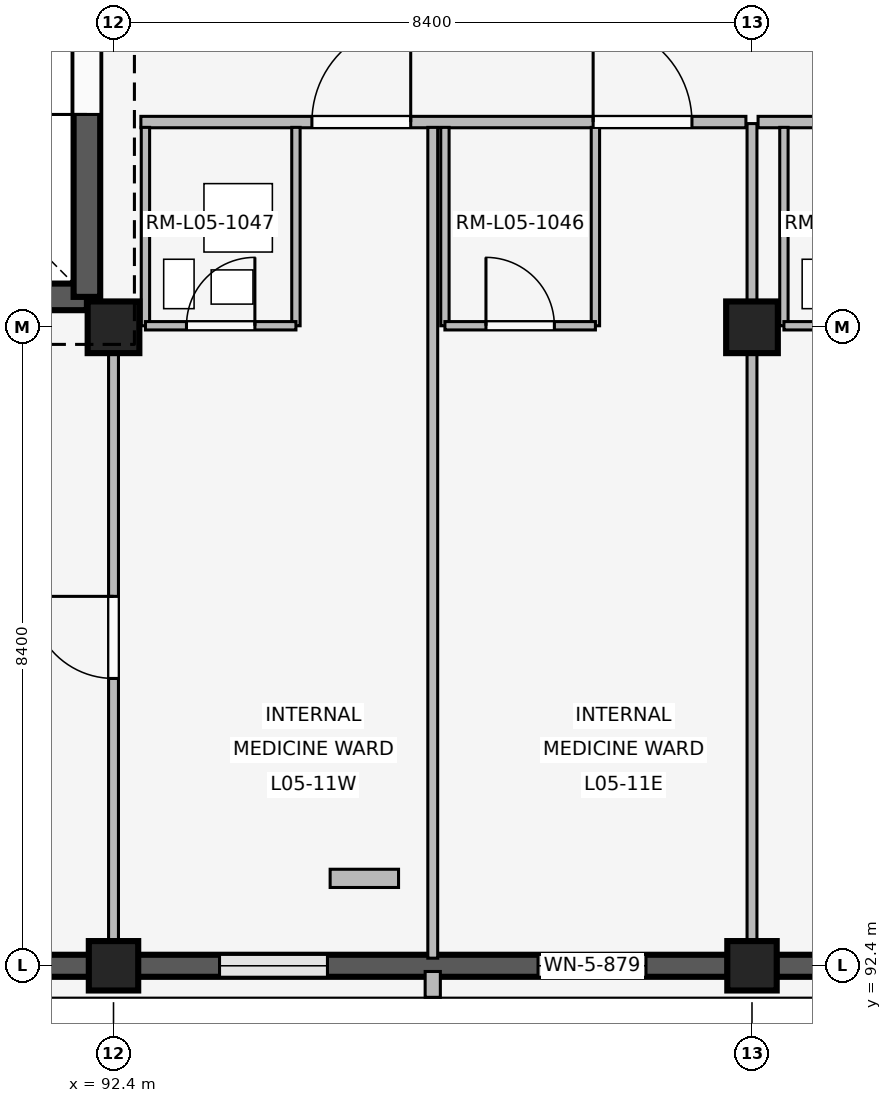
"""IFC4 building model, lengths in metres.
Left out: names, types, materials, properties, quantities, classifications, styles, units other than length and angle.
Written with IfcOpenShell. Run it as: python <this file> out.ifc"""

import sys

from ifc_helpers import new_model, si_unit, direction, frame, frame_2d, origin, origin_2d, place, context, subcontext, project, spatial, rectangle, extrude, element, fill, save


model = new_model("IFC4")
c1 = context("Model", 3, precision=1e-05, world=origin(), true_north=direction((0.0, 1.0)))
c2 = subcontext(c1, "Body", "Model", "MODEL_VIEW")
j1 = project(units=[si_unit("LENGTHUNIT", "METRE"), si_unit("PLANEANGLEUNIT", "RADIAN")], contexts=[c1])
p1 = place(None, origin())
s1 = spatial("IfcSite", under=j1, at=p1, CompositionType="ELEMENT")
p2 = place(p1, origin())
s2 = spatial("IfcBuilding", under=s1, at=p2, CompositionType="ELEMENT")
p3 = place(p2, frame((0.0, 0.0, 20.4)))
s3 = spatial("IfcBuildingStorey", under=s2, at=p3, CompositionType="ELEMENT", Elevation=20.4)
p4 = place(p3, frame((92.4, 92.4, 0.0), z_axis=(0.0, 0.0, 1.0), x_axis=(1.0, 0.0, 0.0)))
e1 = element("IfcColumn", 1, at=p4, inside=s3, PredefinedType="COLUMN", context=c2, shape_type="SweptSolid", body=[
    extrude(rectangle(XDim=0.65, YDim=0.65, at=origin_2d()), origin(), (0.0, 0.0, 1.0), 4.2),
])
p5 = place(p3, frame((92.4, 100.8, 0.0), z_axis=(0.0, 0.0, 1.0), x_axis=(1.0, 0.0, 0.0)))
e2 = element("IfcColumn", 2, at=p5, inside=s3, PredefinedType="COLUMN", context=c2, shape_type="SweptSolid", body=[
    extrude(rectangle(XDim=0.68, YDim=0.68, at=origin_2d()), origin(), (0.0, 0.0, 1.0), 4.2),
])
p6 = place(p3, frame((100.8, 92.4, 0.0), z_axis=(0.0, 0.0, 1.0), x_axis=(1.0, 0.0, 0.0)))
e3 = element("IfcColumn", 3, at=p6, inside=s3, PredefinedType="COLUMN", context=c2, shape_type="SweptSolid", body=[
    extrude(rectangle(XDim=0.65, YDim=0.65, at=origin_2d()), origin(), (0.0, 0.0, 1.0), 4.2),
])
p7 = place(p3, frame((100.8, 100.8, 0.0), z_axis=(0.0, 0.0, 1.0), x_axis=(1.0, 0.0, 0.0)))
e4 = element("IfcColumn", 4, at=p7, inside=s3, PredefinedType="COLUMN", context=c2, shape_type="SweptSolid", body=[
    extrude(rectangle(XDim=0.68, YDim=0.68, at=origin_2d()), origin(), (0.0, 0.0, 1.0), 4.2),
])
p8 = place(p3, frame((92.08, 92.4, 0.0), z_axis=(0.0, 0.0, 1.0), x_axis=(-1.0, 0.0, 0.0)))
e5 = element("IfcWall", 5, at=p8, inside=s3, PredefinedType="SOLIDWALL", context=c2, shape_type="SweptSolid", body=[
    extrude(rectangle(XDim=7.76, YDim=0.29, at=frame_2d((3.88, 0.0))), origin(), (0.0, 0.0, 1.0), 3.34),
])
p9 = place(p8, frame((1.045, 0.0, 0.85)))
e6 = element("IfcOpeningElement", 6, at=p9, cuts=e5, PredefinedType="OPENING", context=c2, shape_type="SweptSolid", body=[
    extrude(rectangle(XDim=1.48, YDim=1.6, at=frame_2d((0.74, 0.8))), frame((0.0, 0.155, 0.0), z_axis=(0.0, -1.0, 0.0), x_axis=(1.0, 0.0, 0.0)), (0.0, 0.0, 1.0), 0.31),
])
p10 = place(p8, frame((5.235, 0.0, 0.85)))
e7 = element("IfcOpeningElement", 7, at=p10, cuts=e5, PredefinedType="OPENING", context=c2, shape_type="SweptSolid", body=[
    extrude(rectangle(XDim=1.48, YDim=1.6, at=frame_2d((0.74, 0.8))), frame((0.0, 0.155, 0.0), z_axis=(0.0, -1.0, 0.0), x_axis=(1.0, 0.0, 0.0)), (0.0, 0.0, 1.0), 0.31),
])
p11 = place(p3, frame((100.48, 92.4, 0.0), z_axis=(0.0, 0.0, 1.0), x_axis=(-1.0, 0.0, 0.0)))
e8 = element("IfcWall", 8, at=p11, inside=s3, PredefinedType="SOLIDWALL", context=c2, shape_type="SweptSolid", body=[
    extrude(rectangle(XDim=7.76, YDim=0.29, at=frame_2d((3.88, 0.0))), origin(), (0.0, 0.0, 1.0), 3.34),
])
p12 = place(p11, frame((1.075, 0.0, 0.85)))
e9 = element("IfcOpeningElement", 9, at=p12, cuts=e8, PredefinedType="OPENING", context=c2, shape_type="SweptSolid", body=[
    extrude(rectangle(XDim=1.42, YDim=1.45, at=frame_2d((0.71, 0.725))), frame((0.0, 0.155, 0.0), z_axis=(0.0, -1.0, 0.0), x_axis=(1.0, 0.0, 0.0)), (0.0, 0.0, 1.0), 0.31),
])
p13 = place(p11, frame((5.265, 0.0, 0.85)))
e10 = element("IfcOpeningElement", 10, at=p13, cuts=e8, PredefinedType="OPENING", context=c2, shape_type="SweptSolid", body=[
    extrude(rectangle(XDim=1.42, YDim=1.45, at=frame_2d((0.71, 0.725))), frame((0.0, 0.155, 0.0), z_axis=(0.0, -1.0, 0.0), x_axis=(1.0, 0.0, 0.0)), (0.0, 0.0, 1.0), 0.31),
])
p14 = place(p3, frame((96.6, 92.325, 0.0), z_axis=(0.0, 0.0, 1.0), x_axis=(0.0, -1.0, 0.0)))
e11 = element("IfcWall", 11, at=p14, inside=s3, PredefinedType="ELEMENTEDWALL", context=c2, shape_type="SweptSolid", body=[
    extrude(rectangle(XDim=0.34, YDim=0.2, at=frame_2d((0.17, 0.0))), origin(), (0.0, 0.0, 1.0), 3.32),
])
p15 = place(p3, frame((108.88, 92.4, 0.0), z_axis=(0.0, 0.0, 1.0), x_axis=(-1.0, 0.0, 0.0)))
e12 = element("IfcWall", 12, at=p15, inside=s3, PredefinedType="SOLIDWALL", context=c2, shape_type="SweptSolid", body=[
    extrude(rectangle(XDim=7.76, YDim=0.29, at=frame_2d((3.88, 0.0))), origin(), (0.0, 0.0, 1.0), 3.34),
])
p16 = place(p15, frame((0.955, 0.0, 0.85)))
e13 = element("IfcOpeningElement", 13, at=p16, cuts=e12, PredefinedType="OPENING", context=c2, shape_type="SweptSolid", body=[
    extrude(rectangle(XDim=1.66, YDim=1.95, at=frame_2d((0.83, 0.975))), frame((0.0, 0.155, 0.0), z_axis=(0.0, -1.0, 0.0), x_axis=(1.0, 0.0, 0.0)), (0.0, 0.0, 1.0), 0.31),
])
p17 = place(p15, frame((5.145, 0.0, 0.85)))
e14 = element("IfcOpeningElement", 14, at=p17, cuts=e12, PredefinedType="OPENING", context=c2, shape_type="SweptSolid", body=[
    extrude(rectangle(XDim=1.66, YDim=1.95, at=frame_2d((0.83, 0.975))), frame((0.0, 0.155, 0.0), z_axis=(0.0, -1.0, 0.0), x_axis=(1.0, 0.0, 0.0)), (0.0, 0.0, 1.0), 0.31),
])
p18 = place(p3, frame((84.55, 101.2, 0.0), z_axis=(0.0, 0.0, 1.0), x_axis=(1.0, 0.0, 0.0)))
e15 = element("IfcWall", 15, at=p18, inside=s3, PredefinedType="SHEAR", context=c2, shape_type="SweptSolid", body=[
    extrude(rectangle(XDim=7.5, YDim=0.35, at=frame_2d((3.75, 0.0))), origin(), (0.0, 0.0, 1.0), 3.92),
])
p19 = place(p18, frame((4.85, 0.0, 0.0)))
e16 = element("IfcOpeningElement", 16, at=p19, cuts=e15, PredefinedType="OPENING", context=c2, shape_type="SweptSolid", body=[
    extrude(rectangle(XDim=1.2, YDim=2.2, at=frame_2d((0.6, 1.1))), frame((0.0, 0.185, 0.0), z_axis=(0.0, -1.0, 0.0), x_axis=(1.0, 0.0, 0.0)), (0.0, 0.0, 1.0), 0.37),
])
p20 = place(p3, frame((92.05, 101.2, 0.0), z_axis=(0.0, 0.0, 1.0), x_axis=(0.0, 1.0, 0.0)))
e17 = element("IfcWall", 17, at=p20, inside=s3, PredefinedType="SHEAR", context=c2, shape_type="SweptSolid", body=[
    extrude(rectangle(XDim=7.55, YDim=0.35, at=frame_2d((3.775, 0.0))), origin(), (0.0, 0.0, 1.0), 3.92),
])
p21 = place(p20, frame((2.4, 0.0, 0.0)))
e18 = element("IfcOpeningElement", 18, at=p21, cuts=e17, PredefinedType="OPENING", context=c2, shape_type="SweptSolid", body=[
    extrude(rectangle(XDim=1.2, YDim=2.2, at=frame_2d((0.6, 1.1))), frame((0.0, 0.185, 0.0), z_axis=(0.0, -1.0, 0.0), x_axis=(1.0, 0.0, 0.0)), (0.0, 0.0, 1.0), 0.37),
])
p22 = place(p3, frame((92.4, 92.54, 0.0), z_axis=(0.0, 0.0, 1.0), x_axis=(0.0, 1.0, 0.0)))
e19 = element("IfcWall", 19, at=p22, inside=s3, PredefinedType="PARTITIONING", context=c2, shape_type="SweptSolid", body=[
    extrude(rectangle(XDim=8.21, YDim=0.13, at=frame_2d((4.105, 0.0))), origin(), (0.0, 0.0, 1.0), 3.32),
])
p23 = place(p22, frame((3.64, 0.0, 0.0)))
e20 = element("IfcOpeningElement", 20, at=p23, cuts=e19, PredefinedType="OPENING", context=c2, shape_type="SweptSolid", body=[
    extrude(rectangle(XDim=1.08, YDim=2.15, at=frame_2d((0.54, 1.075))), frame((0.0, 0.075, 0.0), z_axis=(0.0, -1.0, 0.0), x_axis=(1.0, 0.0, 0.0)), (0.0, 0.0, 1.0), 0.15),
])
p24 = place(p3, frame((92.76, 103.5, 0.0), z_axis=(0.0, 0.0, 1.0), x_axis=(1.0, 0.0, 0.0)))
e21 = element("IfcWall", 21, at=p24, inside=s3, PredefinedType="PARTITIONING", context=c2, shape_type="SweptSolid", body=[
    extrude(rectangle(XDim=7.96, YDim=0.15, at=frame_2d((3.98, 0.0))), origin(), (0.0, 0.0, 1.0), 3.32),
])
p25 = place(p24, frame((2.25, 0.0, 0.0)))
e22 = element("IfcOpeningElement", 22, at=p25, cuts=e21, PredefinedType="OPENING", context=c2, shape_type="SweptSolid", body=[
    extrude(rectangle(XDim=1.3, YDim=2.25, at=frame_2d((0.65, 1.125))), frame((0.0, 0.085, 0.0), z_axis=(0.0, -1.0, 0.0), x_axis=(1.0, 0.0, 0.0)), (0.0, 0.0, 1.0), 0.17),
])
p26 = place(p24, frame((5.95, 0.0, 0.0)))
e23 = element("IfcOpeningElement", 23, at=p26, cuts=e21, PredefinedType="OPENING", context=c2, shape_type="SweptSolid", body=[
    extrude(rectangle(XDim=1.3, YDim=2.25, at=frame_2d((0.65, 1.125))), frame((0.0, 0.085, 0.0), z_axis=(0.0, -1.0, 0.0), x_axis=(1.0, 0.0, 0.0)), (0.0, 0.0, 1.0), 0.17),
])
p27 = place(p3, frame((96.6, 92.5, 0.0), z_axis=(0.0, 0.0, 1.0), x_axis=(0.0, 1.0, 0.0)))
e24 = element("IfcWall", 24, at=p27, inside=s3, PredefinedType="PARTITIONING", context=c2, shape_type="SweptSolid", body=[
    extrude(rectangle(XDim=10.93, YDim=0.13, at=frame_2d((5.465, 0.0))), origin(), (0.0, 0.0, 1.0), 3.32),
])
for number, where, z_axis, x_axis in (
    (25, (92.82, 100.82, 0.0), (0.0, 0.0, 1.0), (0.0, 1.0, 0.0)),
    (26, (94.8, 100.82, 0.0), (0.0, 0.0, 1.0), (0.0, 1.0, 0.0)),
):
    element("IfcWall", number, at=place(p3, frame(where, z_axis=z_axis, x_axis=x_axis)), inside=s3, PredefinedType="PARTITIONING", context=c2, shape_type="SweptSolid", body=[
        extrude(rectangle(XDim=2.61, YDim=0.11, at=frame_2d((1.305, 0.0))), origin(), (0.0, 0.0, 1.0), 3.32),
    ])
p28 = place(p3, frame((92.82, 100.82, 0.0), z_axis=(0.0, 0.0, 1.0), x_axis=(1.0, 0.0, 0.0)))
e27 = element("IfcWall", 27, at=p28, inside=s3, PredefinedType="PARTITIONING", context=c2, shape_type="SweptSolid", body=[
    extrude(rectangle(XDim=1.98, YDim=0.11, at=frame_2d((0.99, 0.0))), origin(), (0.0, 0.0, 1.0), 3.32),
])
p29 = place(p28, frame((0.54, 0.0, 0.0)))
e28 = element("IfcOpeningElement", 28, at=p29, cuts=e27, PredefinedType="OPENING", context=c2, shape_type="SweptSolid", body=[
    extrude(rectangle(XDim=0.9, YDim=2.1, at=frame_2d((0.45, 1.05))), frame((0.0, 0.065, 0.0), z_axis=(0.0, -1.0, 0.0), x_axis=(1.0, 0.0, 0.0)), (0.0, 0.0, 1.0), 0.13),
])
for number, where, z_axis, x_axis in (
    (29, (96.76, 100.82, 0.0), (0.0, 0.0, 1.0), (0.0, 1.0, 0.0)),
    (30, (98.74, 100.82, 0.0), (0.0, 0.0, 1.0), (0.0, 1.0, 0.0)),
):
    element("IfcWall", number, at=place(p3, frame(where, z_axis=z_axis, x_axis=x_axis)), inside=s3, PredefinedType="PARTITIONING", context=c2, shape_type="SweptSolid", body=[
        extrude(rectangle(XDim=2.61, YDim=0.11, at=frame_2d((1.305, 0.0))), origin(), (0.0, 0.0, 1.0), 3.32),
    ])
p30 = place(p3, frame((96.76, 100.82, 0.0), z_axis=(0.0, 0.0, 1.0), x_axis=(1.0, 0.0, 0.0)))
e31 = element("IfcWall", 31, at=p30, inside=s3, PredefinedType="PARTITIONING", context=c2, shape_type="SweptSolid", body=[
    extrude(rectangle(XDim=1.98, YDim=0.11, at=frame_2d((0.99, 0.0))), origin(), (0.0, 0.0, 1.0), 3.32),
])
p31 = place(p30, frame((0.54, 0.0, 0.0)))
e32 = element("IfcOpeningElement", 32, at=p31, cuts=e31, PredefinedType="OPENING", context=c2, shape_type="SweptSolid", body=[
    extrude(rectangle(XDim=0.9, YDim=2.1, at=frame_2d((0.45, 1.05))), frame((0.0, 0.065, 0.0), z_axis=(0.0, -1.0, 0.0), x_axis=(1.0, 0.0, 0.0)), (0.0, 0.0, 1.0), 0.13),
])
p32 = place(p3, frame((95.25, 93.55, 0.0), z_axis=(0.0, 0.0, 1.0), x_axis=(1.0, 0.0, 0.0)))
e33 = element("IfcWall", 33, at=p32, inside=s3, PredefinedType="PLUMBINGWALL", context=c2, shape_type="SweptSolid", body=[
    extrude(rectangle(XDim=0.9, YDim=0.24, at=frame_2d((0.45, 0.0))), origin(), (0.0, 0.0, 1.0), 3.32),
])
p33 = place(p3, frame((100.8, 92.54, 0.0), z_axis=(0.0, 0.0, 1.0), x_axis=(0.0, 1.0, 0.0)))
e34 = element("IfcWall", 34, at=p33, inside=s3, PredefinedType="PARTITIONING", context=c2, shape_type="SweptSolid", body=[
    extrude(rectangle(XDim=10.94, YDim=0.13, at=frame_2d((5.47, 0.0))), origin(), (0.0, 0.0, 1.0), 3.32),
])
p34 = place(p3, frame((100.88, 103.5, 0.0), z_axis=(0.0, 0.0, 1.0), x_axis=(1.0, 0.0, 0.0)))
e35 = element("IfcWall", 35, at=p34, inside=s3, PredefinedType="PARTITIONING", context=c2, shape_type="SweptSolid", body=[
    extrude(rectangle(XDim=8.24, YDim=0.15, at=frame_2d((4.12, 0.0))), origin(), (0.0, 0.0, 1.0), 3.32),
])
p35 = place(p34, frame((2.53, 0.0, 0.0)))
e36 = element("IfcOpeningElement", 36, at=p35, cuts=e35, PredefinedType="OPENING", context=c2, shape_type="SweptSolid", body=[
    extrude(rectangle(XDim=1.3, YDim=2.25, at=frame_2d((0.65, 1.125))), frame((0.0, 0.085, 0.0), z_axis=(0.0, -1.0, 0.0), x_axis=(1.0, 0.0, 0.0)), (0.0, 0.0, 1.0), 0.17),
])
p36 = place(p34, frame((6.23, 0.0, 0.0)))
e37 = element("IfcOpeningElement", 37, at=p36, cuts=e35, PredefinedType="OPENING", context=c2, shape_type="SweptSolid", body=[
    extrude(rectangle(XDim=1.3, YDim=2.25, at=frame_2d((0.65, 1.125))), frame((0.0, 0.085, 0.0), z_axis=(0.0, -1.0, 0.0), x_axis=(1.0, 0.0, 0.0)), (0.0, 0.0, 1.0), 0.17),
])
p37 = place(p3, frame((101.22, 100.82, 0.0), z_axis=(0.0, 0.0, 1.0), x_axis=(0.0, 1.0, 0.0)))
e38 = element("IfcWall", 38, at=p37, inside=s3, PredefinedType="PARTITIONING", context=c2, shape_type="SweptSolid", body=[
    extrude(rectangle(XDim=2.61, YDim=0.11, at=frame_2d((1.305, 0.0))), origin(), (0.0, 0.0, 1.0), 3.32),
])
p38 = place(p3, frame((101.22, 100.82, 0.0), z_axis=(0.0, 0.0, 1.0), x_axis=(1.0, 0.0, 0.0)))
e39 = element("IfcWall", 39, at=p38, inside=s3, PredefinedType="PARTITIONING", context=c2, shape_type="SweptSolid", body=[
    extrude(rectangle(XDim=1.98, YDim=0.11, at=frame_2d((0.99, 0.0))), origin(), (0.0, 0.0, 1.0), 3.32),
])
p39 = place(p38, frame((0.54, 0.0, 0.0)))
e40 = element("IfcOpeningElement", 40, at=p39, cuts=e39, PredefinedType="OPENING", context=c2, shape_type="SweptSolid", body=[
    extrude(rectangle(XDim=0.9, YDim=2.1, at=frame_2d((0.45, 1.05))), frame((0.0, 0.065, 0.0), z_axis=(0.0, -1.0, 0.0), x_axis=(1.0, 0.0, 0.0)), (0.0, 0.0, 1.0), 0.13),
])
p40 = place(p12, origin())
e41 = element("IfcWindow", 41, at=p40, inside=s3, PartitioningType="SINGLE_PANEL", PredefinedType="WINDOW", context=c2, shape_type="SweptSolid", body=[
    extrude(rectangle(XDim=1.42, YDim=1.45, at=frame_2d((0.71, 0.725))), frame((0.0, 0.03, 0.0), z_axis=(0.0, -1.0, 0.0), x_axis=(1.0, 0.0, 0.0)), (0.0, 0.0, 1.0), 0.06),
])
fill(e9, e41)
p41 = place(p13, origin())
e42 = element("IfcWindow", 42, at=p41, inside=s3, PartitioningType="SINGLE_PANEL", PredefinedType="WINDOW", context=c2, shape_type="SweptSolid", body=[
    extrude(rectangle(XDim=1.42, YDim=1.45, at=frame_2d((0.71, 0.725))), frame((0.0, 0.03, 0.0), z_axis=(0.0, -1.0, 0.0), x_axis=(1.0, 0.0, 0.0)), (0.0, 0.0, 1.0), 0.06),
])
fill(e10, e42)
p42 = place(p21, origin())
e43 = element("IfcDoor", 43, at=p42, inside=s3, OperationType="SINGLE_SWING_LEFT", PredefinedType="DOOR", context=c2, shape_type="SweptSolid", body=[
    extrude(rectangle(XDim=1.2, YDim=2.2, at=frame_2d((0.6, 1.1))), frame((0.0, 0.025, 0.0), z_axis=(0.0, -1.0, 0.0), x_axis=(1.0, 0.0, 0.0)), (0.0, 0.0, 1.0), 0.05),
])
fill(e18, e43)
p43 = place(p23, origin())
e44 = element("IfcDoor", 44, at=p43, inside=s3, OperationType="SINGLE_SWING_RIGHT", PredefinedType="DOOR", context=c2, shape_type="SweptSolid", body=[
    extrude(rectangle(XDim=1.08, YDim=2.15, at=frame_2d((0.54, 1.075))), frame((0.0, 0.025, 0.0), z_axis=(0.0, -1.0, 0.0), x_axis=(1.0, 0.0, 0.0)), (0.0, 0.0, 1.0), 0.05),
])
fill(e20, e44)
p44 = place(p25, origin())
e45 = element("IfcDoor", 45, at=p44, inside=s3, OperationType="SINGLE_SWING_RIGHT", PredefinedType="DOOR", context=c2, shape_type="SweptSolid", body=[
    extrude(rectangle(XDim=1.3, YDim=2.25, at=frame_2d((0.65, 1.125))), frame((0.0, 0.025, 0.0), z_axis=(0.0, -1.0, 0.0), x_axis=(1.0, 0.0, 0.0)), (0.0, 0.0, 1.0), 0.05),
])
fill(e22, e45)
p45 = place(p26, origin())
e46 = element("IfcDoor", 46, at=p45, inside=s3, OperationType="SINGLE_SWING_LEFT", PredefinedType="DOOR", context=c2, shape_type="SweptSolid", body=[
    extrude(rectangle(XDim=1.3, YDim=2.25, at=frame_2d((0.65, 1.125))), frame((0.0, 0.025, 0.0), z_axis=(0.0, -1.0, 0.0), x_axis=(1.0, 0.0, 0.0)), (0.0, 0.0, 1.0), 0.05),
])
fill(e23, e46)
p46 = place(p29, origin())
e47 = element("IfcDoor", 47, at=p46, inside=s3, OperationType="SINGLE_SWING_RIGHT", PredefinedType="DOOR", context=c2, shape_type="SweptSolid", body=[
    extrude(rectangle(XDim=0.9, YDim=2.1, at=frame_2d((0.45, 1.05))), frame((0.0, 0.025, 0.0), z_axis=(0.0, -1.0, 0.0), x_axis=(1.0, 0.0, 0.0)), (0.0, 0.0, 1.0), 0.05),
])
fill(e28, e47)
p47 = place(p31, origin())
e48 = element("IfcDoor", 48, at=p47, inside=s3, OperationType="SINGLE_SWING_LEFT", PredefinedType="DOOR", context=c2, shape_type="SweptSolid", body=[
    extrude(rectangle(XDim=0.9, YDim=2.1, at=frame_2d((0.45, 1.05))), frame((0.0, 0.025, 0.0), z_axis=(0.0, -1.0, 0.0), x_axis=(1.0, 0.0, 0.0)), (0.0, 0.0, 1.0), 0.05),
])
fill(e32, e48)
save(model, sys.argv[1])
